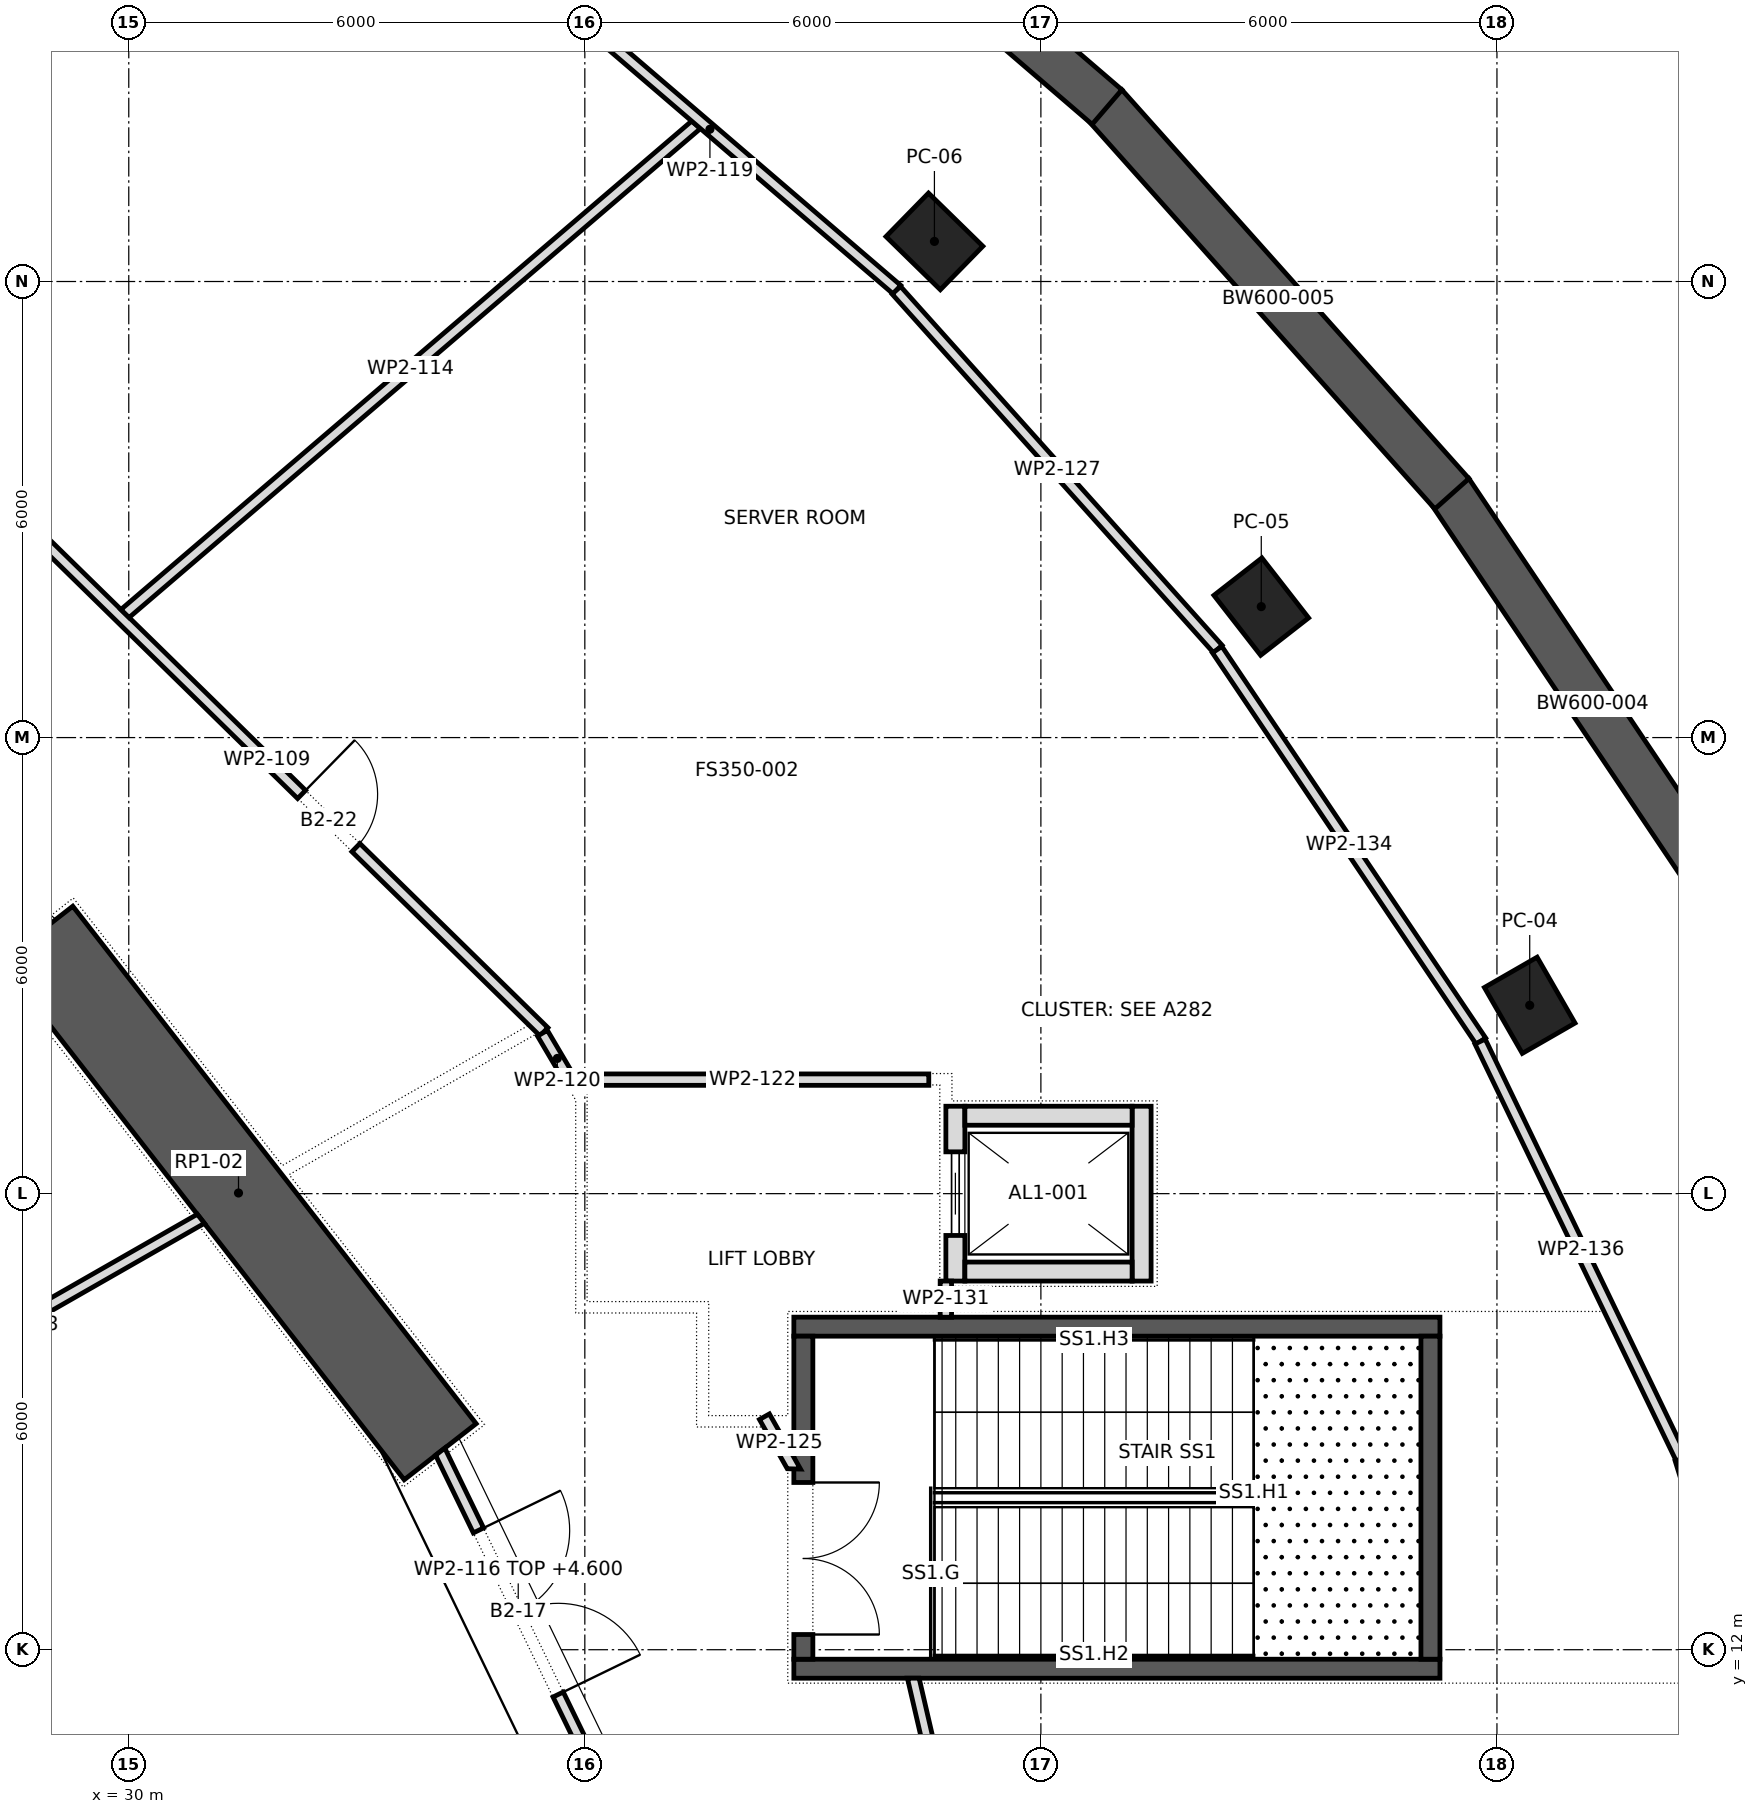
"""IFC4 building model, lengths in metres.
Left out: names, types, materials, properties, quantities, classifications, styles, units other than length and angle.
Written with IfcOpenShell. Run it as: python <this file> out.ifc"""

import sys

from ifc_helpers import new_model, si_unit, direction, frame, frame_2d, origin, origin_2d, place, context, subcontext, project, spatial, polyline, rectangle, outline, extrude, element, fill, save


model = new_model("IFC4")
c1 = context("Model", 3, precision=1e-05, world=origin(), true_north=direction((0.0, 1.0)))
c2 = subcontext(c1, "Body", "Model", "MODEL_VIEW")
j1 = project(units=[si_unit("LENGTHUNIT", "METRE"), si_unit("PLANEANGLEUNIT", "RADIAN")], contexts=[c1])
p1 = place(None, origin())
s1 = spatial("IfcSite", under=j1, at=p1, CompositionType="ELEMENT")
p2 = place(p1, origin())
s2 = spatial("IfcBuilding", under=s1, at=p2, CompositionType="ELEMENT")
p3 = place(p2, frame((0.0, 0.0, -9.5)))
s3 = spatial("IfcBuildingStorey", under=s2, at=p3, CompositionType="ELEMENT", Elevation=-9.5)
for number, where, z_axis, x_axis in (
    (1, (48.431, 20.478, 0.0), (0.0, 0.0, 1.0), (-0.499, 0.867, 0.0)),
    (2, (44.899, 25.723, 0.0), (0.0, 0.0, 1.0), (-0.615, 0.789, 0.0)),
    (3, (40.599, 30.528, 0.0), (0.0, 0.0, 1.0), (-0.715, 0.699, 0.0)),
):
    element("IfcColumn", number, at=place(p3, frame(where, z_axis=z_axis, x_axis=x_axis)), inside=s3, PredefinedType="COLUMN", context=c2, shape_type="SweptSolid", body=[
        extrude(rectangle(XDim=1.0, YDim=0.8, at=origin_2d()), origin(), (0.0, 0.0, 1.0), 5.5),
    ])
p4 = place(p3, frame((34.097, 14.605, 0.0), z_axis=(0.0, 0.0, 1.0), x_axis=(-0.614825322247, 0.788663314174, 0.0)))
e4 = element("IfcWall", 4, at=p4, inside=s3, PredefinedType="SHEAR", context=c2, shape_type="SweptSolid", body=[
    extrude(rectangle(XDim=8.632, YDim=1.2, at=frame_2d((4.316, 0.0))), origin(), (0.0, 0.0, 1.0), 5.5),
])
p5 = place(p3, frame((51.134, 21.654, 0.0), z_axis=(0.0, 0.0, 1.0), x_axis=(-0.557518861869, 0.830164272093, 0.0)))
e5 = element("IfcWall", 5, at=p5, inside=s3, PredefinedType="SOLIDWALL", context=c2, shape_type="SweptSolid", body=[
    extrude(rectangle(XDim=6.729, YDim=0.6, at=frame_2d((3.364, 0.0))), origin(), (0.0, 0.0, 1.0), 5.5),
])
p6 = place(p3, frame((47.407, 27.208, 0.0), z_axis=(0.0, 0.0, 1.0), x_axis=(-0.665894053378, 0.74604631872, 0.0)))
e6 = element("IfcWall", 6, at=p6, inside=s3, PredefinedType="SOLIDWALL", context=c2, shape_type="SweptSolid", body=[
    extrude(rectangle(XDim=6.856, YDim=0.6, at=frame_2d((3.428, 0.0))), origin(), (0.0, 0.0, 1.0), 5.5),
])
p7 = place(p3, frame((42.87, 32.295, 0.0), z_axis=(0.0, 0.0, 1.0), x_axis=(-0.758319142722, 0.65188348482, 0.0)))
e7 = element("IfcWall", 7, at=p7, inside=s3, PredefinedType="SOLIDWALL", context=c2, shape_type="SweptSolid", body=[
    extrude(rectangle(XDim=6.991, YDim=0.6, at=frame_2d((3.496, 0.0))), origin(), (0.0, 0.0, 1.0), 5.5),
])
for number, where, z_axis, x_axis in (
    (8, (38.75, 16.25, 0.0), (0.0, 0.0, 1.0), (1.0, 0.0, 0.0)),
    (9, (38.75, 11.75, 0.0), (0.0, 0.0, 1.0), (1.0, 0.0, 0.0)),
):
    element("IfcWall", number, at=place(p3, frame(where, z_axis=z_axis, x_axis=x_axis)), inside=s3, PredefinedType="SHEAR", context=c2, shape_type="SweptSolid", body=[
        extrude(rectangle(XDim=8.5, YDim=0.25, at=frame_2d((4.25, 0.0))), origin(), (0.0, 0.0, 1.0), 5.05),
    ])
p8 = place(p3, frame((38.875, 11.875, 0.0), z_axis=(0.0, 0.0, 1.0), x_axis=(0.0, 1.0, 0.0)))
e10 = element("IfcWall", 10, at=p8, inside=s3, PredefinedType="SHEAR", context=c2, shape_type="SweptSolid", body=[
    extrude(rectangle(XDim=4.25, YDim=0.25, at=frame_2d((2.125, 0.0))), origin(), (0.0, 0.0, 1.0), 5.05),
])
p9 = place(p8, frame((0.325, 0.0, 0.0)))
e11 = element("IfcOpeningElement", 11, at=p9, cuts=e10, PredefinedType="OPENING", context=c2, shape_type="SweptSolid", body=[
    extrude(rectangle(XDim=2.0, YDim=2.1, at=frame_2d((1.0, 1.05))), frame((0.0, 0.137, 0.0), z_axis=(0.0, -1.0, 0.0), x_axis=(1.0, 0.0, 0.0)), (0.0, 0.0, 1.0), 0.274),
])
p10 = place(p3, frame((47.125, 11.875, 0.0), z_axis=(0.0, 0.0, 1.0), x_axis=(0.0, 1.0, 0.0)))
e12 = element("IfcWall", 12, at=p10, inside=s3, PredefinedType="SHEAR", context=c2, shape_type="SweptSolid", body=[
    extrude(rectangle(XDim=4.25, YDim=0.25, at=frame_2d((2.125, 0.0))), origin(), (0.0, 0.0, 1.0), 5.05),
])
p11 = place(p3, frame((40.875, 16.85, 0.0), z_axis=(0.0, 0.0, 1.0), x_axis=(0.0, 1.0, 0.0)))
e13 = element("IfcWall", 13, at=p11, inside=s3, PredefinedType="PARTITIONING", context=c2, shape_type="SweptSolid", body=[
    extrude(rectangle(XDim=2.3, YDim=0.25, at=frame_2d((1.15, 0.0))), origin(), (0.0, 0.0, 1.0), 5.05),
])
p12 = place(p11, frame((0.6, 0.0, 0.0)))
e14 = element("IfcOpeningElement", 14, at=p12, cuts=e13, PredefinedType="OPENING", context=c2, shape_type="SweptSolid", body=[
    extrude(rectangle(XDim=1.1, YDim=2.1, at=frame_2d((0.55, 1.05))), frame((0.0, 0.137, 0.0), z_axis=(0.0, -1.0, 0.0), x_axis=(1.0, 0.0, 0.0)), (0.0, 0.0, 1.0), 0.274),
])
p13 = place(p3, frame((43.325, 16.85, 0.0), z_axis=(0.0, 0.0, 1.0), x_axis=(0.0, 1.0, 0.0)))
e15 = element("IfcWall", 15, at=p13, inside=s3, PredefinedType="PARTITIONING", context=c2, shape_type="SweptSolid", body=[
    extrude(rectangle(XDim=2.3, YDim=0.25, at=frame_2d((1.15, 0.0))), origin(), (0.0, 0.0, 1.0), 5.05),
])
for number, where, z_axis, x_axis in (
    (16, (41.0, 19.025, 0.0), (0.0, 0.0, 1.0), (1.0, 0.0, 0.0)),
    (17, (41.0, 16.975, 0.0), (0.0, 0.0, 1.0), (1.0, 0.0, 0.0)),
):
    element("IfcWall", number, at=place(p3, frame(where, z_axis=z_axis, x_axis=x_axis)), inside=s3, PredefinedType="PARTITIONING", context=c2, shape_type="SweptSolid", body=[
        extrude(rectangle(XDim=2.2, YDim=0.25, at=frame_2d((1.1, 0.0))), origin(), (0.0, 0.0, 1.0), 5.05),
    ])
p14 = place(p3, frame((26.074, 14.882, 0.0), z_axis=(0.0, 0.0, 1.0), x_axis=(0.868133416031, 0.496330909746, 0.0)))
e18 = element("IfcWall", 18, at=p14, inside=s3, PredefinedType="PARTITIONING", context=c2, shape_type="SweptSolid", body=[
    extrude(outline(polyline([(0.0, -0.075), (5.626, -0.075), (5.604, 0.075), (0.0, 0.075), (0.0, -0.075)])), origin(), (0.0, 0.0, 1.0), 5.05),
])
p15 = place(p3, frame((28.174, 27.268, 0.0), z_axis=(0.0, 0.0, 1.0), x_axis=(0.714427427428, -0.699709547554, 0.0)))
e19 = element("IfcWall", 19, at=p15, inside=s3, PredefinedType="PARTITIONING", context=c2, shape_type="SweptSolid", body=[
    extrude(rectangle(XDim=10.202, YDim=0.15, at=frame_2d((5.101, 0.0))), origin(), (0.0, 0.0, 1.0), 5.05),
])
p16 = place(p15, frame((5.74, 0.0, 0.0)))
e20 = element("IfcOpeningElement", 20, at=p16, cuts=e19, PredefinedType="OPENING", context=c2, shape_type="SweptSolid", body=[
    extrude(rectangle(XDim=1.0, YDim=2.1, at=frame_2d((0.5, 1.05))), frame((0.0, 0.087, 0.0), z_axis=(0.0, -1.0, 0.0), x_axis=(1.0, 0.0, 0.0)), (0.0, 0.0, 1.0), 0.174),
])
p17 = place(p3, frame((29.95, 25.632, 0.0), z_axis=(0.0, 0.0, 1.0), x_axis=(0.759739094859, 0.650228042876, 0.0)))
e21 = element("IfcWall", 21, at=p17, inside=s3, PredefinedType="PARTITIONING", context=c2, shape_type="SweptSolid", body=[
    extrude(outline(polyline([(0.007, -0.075), (9.901, -0.075), (9.878, 0.075), (-0.007, 0.075), (0.007, -0.075)])), origin(), (0.0, 0.0, 1.0), 5.05),
])
p18 = place(p3, frame((34.097, 14.606, 0.0), z_axis=(0.0, 0.0, 1.0), x_axis=(0.436936398764, -0.899492403212, 0.0)))
e22 = element("IfcWall", 22, at=p18, inside=s3, PredefinedType="PARTITIONING", context=c2, shape_type="SweptSolid", body=[
    extrude(outline(polyline([(0.016, -0.075), (4.681, -0.075), (4.715, 0.075), (-0.016, 0.075), (0.016, -0.075)])), origin(), (0.0, 0.0, 1.0), 4.6),
])
p19 = place(p18, frame((1.152, 0.0, 0.0)))
e23 = element("IfcOpeningElement", 23, at=p19, cuts=e22, PredefinedType="OPENING", context=c2, shape_type="SweptSolid", body=[
    extrude(rectangle(XDim=2.4, YDim=2.1, at=frame_2d((1.2, 1.05))), frame((0.0, 0.087, 0.0), z_axis=(0.0, -1.0, 0.0), x_axis=(1.0, 0.0, 0.0)), (0.0, 0.0, 1.0), 0.174),
])
p20 = place(p3, frame((35.185, 34.114, 0.0), z_axis=(0.0, 0.0, 1.0), x_axis=(0.759033312601, -0.651051787773, 0.0)))
e24 = element("IfcWall", 24, at=p20, inside=s3, PredefinedType="PARTITIONING", context=c2, shape_type="SweptSolid", body=[
    extrude(rectangle(XDim=6.484, YDim=0.15, at=frame_2d((3.242, 0.0))), origin(), (0.0, 0.0, 1.0), 5.05),
])
p21 = place(p3, frame((35.443, 20.111, 0.0), z_axis=(0.0, 0.0, 1.0), x_axis=(0.507767925719, -0.861493896444, 0.0)))
e25 = element("IfcWall", 25, at=p21, inside=s3, PredefinedType="PARTITIONING", context=c2, shape_type="SweptSolid", body=[
    extrude(rectangle(XDim=0.77, YDim=0.15, at=frame_2d((0.385, 0.0))), origin(), (0.0, 0.0, 1.0), 5.05),
])
p22 = place(p3, frame((35.889, 19.5, 0.0), z_axis=(0.0, 0.0, 1.0), x_axis=(1.0, 0.0, 0.0)))
e26 = element("IfcWall", 26, at=p22, inside=s3, PredefinedType="PARTITIONING", context=c2, shape_type="SweptSolid", body=[
    extrude(outline(polyline([(0.045, -0.075), (4.636, -0.075), (4.636, 0.075), (-0.045, 0.075), (0.045, -0.075)])), origin(), (0.0, 0.0, 1.0), 5.05),
])
p23 = place(p3, frame((38.363, 15.065, 0.0), z_axis=(0.0, 0.0, 1.0), x_axis=(0.49173071, -0.870747327784, 0.0)))
e27 = element("IfcWall", 27, at=p23, inside=s3, PredefinedType="PARTITIONING", context=c2, shape_type="SweptSolid", body=[
    extrude(outline(polyline([(0.0, -0.075), (0.743, -0.075), (0.833, 0.075), (0.0, 0.075), (0.0, -0.075)])), origin(), (0.0, 0.0, 1.0), 5.05),
])
p24 = place(p3, frame((40.099, 29.885, 0.0), z_axis=(0.0, 0.0, 1.0), x_axis=(0.6673947824, -0.744704105283, 0.0)))
e28 = element("IfcWall", 28, at=p24, inside=s3, PredefinedType="PARTITIONING", context=c2, shape_type="SweptSolid", body=[
    extrude(rectangle(XDim=6.338, YDim=0.15, at=frame_2d((3.169, 0.0))), origin(), (0.0, 0.0, 1.0), 5.05),
])
p25 = place(p3, frame((40.321, 11.625, 0.0), z_axis=(0.0, 0.0, 1.0), x_axis=(0.226176729561, -0.974086283142, 0.0)))
e29 = element("IfcWall", 29, at=p25, inside=s3, PredefinedType="PARTITIONING", context=c2, shape_type="SweptSolid", body=[
    extrude(outline(polyline([(-0.017, -0.075), (9.501, -0.075), (9.501, 0.075), (0.017, 0.075), (-0.017, -0.075)])), origin(), (0.0, 0.0, 1.0), 5.05),
])
p26 = place(p25, frame((4.249, 0.0, 0.0)))
e30 = element("IfcOpeningElement", 30, at=p26, cuts=e29, PredefinedType="OPENING", context=c2, shape_type="SweptSolid", body=[
    extrude(rectangle(XDim=1.0, YDim=2.1, at=frame_2d((0.5, 1.05))), frame((0.0, 0.087, 0.0), z_axis=(0.0, -1.0, 0.0), x_axis=(1.0, 0.0, 0.0)), (0.0, 0.0, 1.0), 0.174),
])
p27 = place(p3, frame((40.75, 16.85, 0.0), z_axis=(0.0, 0.0, 1.0), x_axis=(0.0, -1.0, 0.0)))
e31 = element("IfcWall", 31, at=p27, inside=s3, PredefinedType="PARTITIONING", context=c2, shape_type="SweptSolid", body=[
    extrude(rectangle(XDim=0.476, YDim=0.15, at=frame_2d((0.238, 0.0))), origin(), (0.0, 0.0, 1.0), 5.05),
])
p28 = place(p3, frame((44.319, 25.157, 0.0), z_axis=(0.0, 0.0, 1.0), x_axis=(0.558812320082, -0.829294152231, 0.0)))
e32 = element("IfcWall", 32, at=p28, inside=s3, PredefinedType="PARTITIONING", context=c2, shape_type="SweptSolid", body=[
    extrude(rectangle(XDim=6.21, YDim=0.15, at=frame_2d((3.105, 0.0))), origin(), (0.0, 0.0, 1.0), 5.05),
])
p29 = place(p3, frame((47.778, 20.001, 0.0), z_axis=(0.0, 0.0, 1.0), x_axis=(0.434690826011, -0.900579749818, 0.0)))
e33 = element("IfcWall", 33, at=p29, inside=s3, PredefinedType="PARTITIONING", context=c2, shape_type="SweptSolid", body=[
    extrude(rectangle(XDim=6.096, YDim=0.15, at=frame_2d((3.048, 0.0))), origin(), (0.0, 0.0, 1.0), 5.05),
])
p30 = place(p3, frame((50.416, 14.506, 0.0), z_axis=(0.0, 0.0, 1.0), x_axis=(0.297713123711, -0.954655380737, 0.0)))
e34 = element("IfcWall", 34, at=p30, inside=s3, PredefinedType="PARTITIONING", context=c2, shape_type="SweptSolid", body=[
    extrude(rectangle(XDim=6.013, YDim=0.15, at=frame_2d((3.006, 0.0))), origin(), (0.0, 0.0, 1.0), 5.05),
])
p31 = place(p12, origin())
e35 = element("IfcDoor", 35, at=p31, inside=s3, OperationType="SLIDING_TO_LEFT", PredefinedType="DOOR", context=c2, shape_type="SweptSolid", body=[
    extrude(rectangle(XDim=1.1, YDim=2.1, at=frame_2d((0.55, 1.05))), frame((0.0, 0.025, 0.0), z_axis=(0.0, -1.0, 0.0), x_axis=(1.0, 0.0, 0.0)), (0.0, 0.0, 1.0), 0.05),
])
fill(e14, e35)
p32 = place(p9, frame((2.0, 0.0, 0.0), z_axis=(0.0, 0.0, 1.0), x_axis=(-1.0, 0.0, 0.0)))
e36 = element("IfcDoor", 36, at=p32, inside=s3, OperationType="DOUBLE_DOOR_SINGLE_SWING", PredefinedType="DOOR", context=c2, shape_type="SweptSolid", body=[
    extrude(rectangle(XDim=2.0, YDim=2.1, at=frame_2d((1.0, 1.05))), frame((0.0, 0.025, 0.0), z_axis=(0.0, -1.0, 0.0), x_axis=(1.0, 0.0, 0.0)), (0.0, 0.0, 1.0), 0.05),
])
fill(e11, e36)
p33 = place(p19, origin())
e37 = element("IfcDoor", 37, at=p33, inside=s3, OperationType="DOUBLE_DOOR_SINGLE_SWING", PredefinedType="DOOR", context=c2, shape_type="SweptSolid", body=[
    extrude(rectangle(XDim=2.4, YDim=2.1, at=frame_2d((1.2, 1.05))), frame((0.0, 0.025, 0.0), z_axis=(0.0, -1.0, 0.0), x_axis=(1.0, 0.0, 0.0)), (0.0, 0.0, 1.0), 0.05),
])
fill(e23, e37)
p34 = place(p16, origin())
e38 = element("IfcDoor", 38, at=p34, inside=s3, OperationType="SINGLE_SWING_RIGHT", PredefinedType="DOOR", context=c2, shape_type="SweptSolid", body=[
    extrude(rectangle(XDim=1.0, YDim=2.1, at=frame_2d((0.5, 1.05))), frame((0.0, 0.025, 0.0), z_axis=(0.0, -1.0, 0.0), x_axis=(1.0, 0.0, 0.0)), (0.0, 0.0, 1.0), 0.05),
])
fill(e20, e38)
save(model, sys.argv[1])
